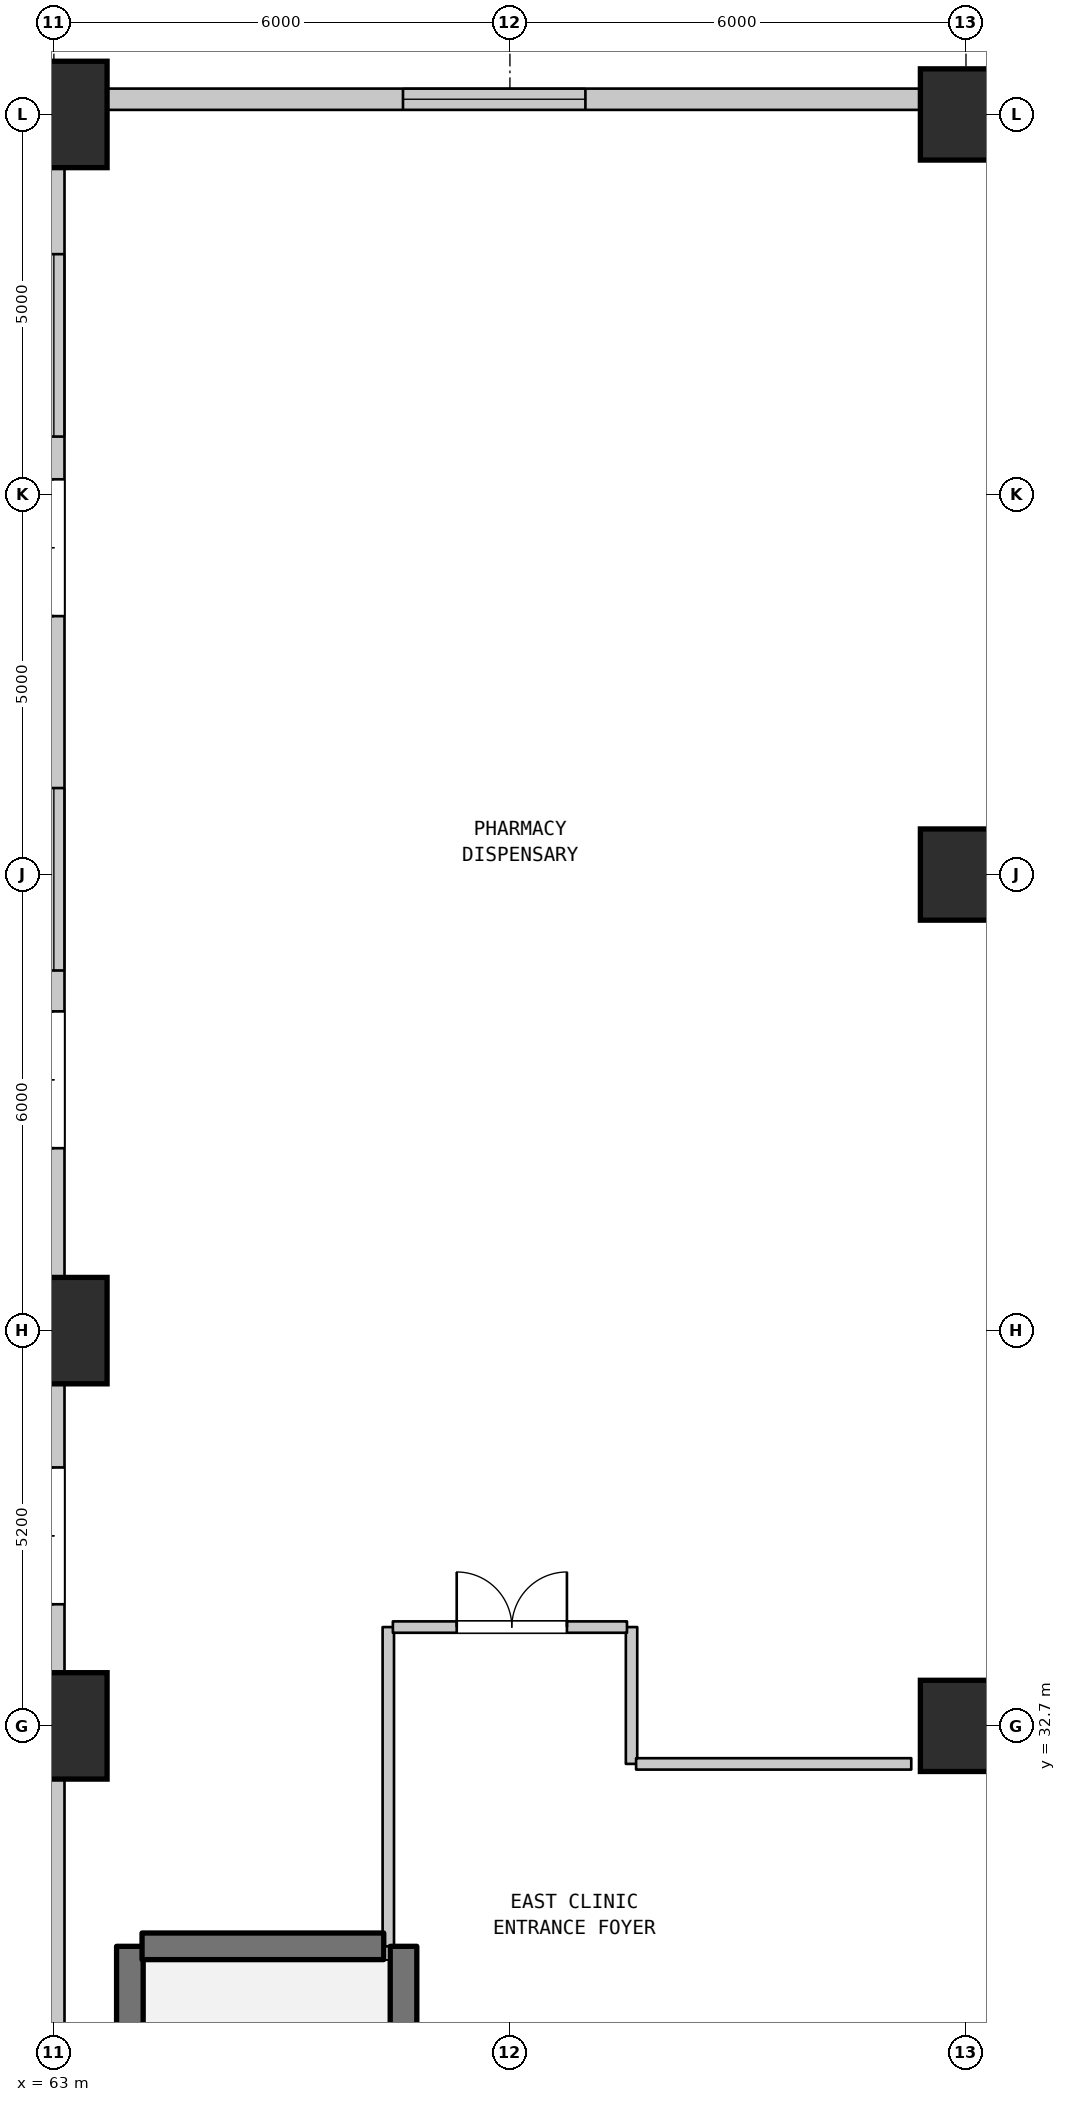
"""IFC4 building model, lengths in metres.
Left out: names, types, materials, properties, quantities, classifications, styles, units other than length and angle.
Written with IfcOpenShell. Run it as: python <this file> out.ifc"""

import sys

from ifc_helpers import new_model, si_unit, direction, frame, frame_2d, origin, origin_2d, place, context, subcontext, project, spatial, rectangle, extrude, element, fill, save


model = new_model("IFC4")
c1 = context("Model", 3, precision=1e-05, world=origin(), true_north=direction((0.0, 1.0)))
c2 = subcontext(c1, "Body", "Model", "MODEL_VIEW")
j1 = project(units=[si_unit("LENGTHUNIT", "METRE"), si_unit("PLANEANGLEUNIT", "RADIAN")], contexts=[c1])
p1 = place(None, origin())
s1 = spatial("IfcSite", under=j1, at=p1, CompositionType="ELEMENT")
p2 = place(p1, origin())
s2 = spatial("IfcBuilding", under=s1, at=p2, CompositionType="ELEMENT")
p3 = place(p2, origin())
s3 = spatial("IfcBuildingStorey", under=s2, at=p3, CompositionType="ELEMENT", Elevation=0.0)
for number, where, z_axis, x_axis in (
    (1, (63.0, 32.7, 0.0), (0.0, 0.0, 1.0), (1.0, 0.0, 0.0)),
    (2, (63.0, 37.9, 0.0), (0.0, 0.0, 1.0), (1.0, 0.0, 0.0)),
    (3, (63.0, 53.9, 0.0), (0.0, 0.0, 1.0), (1.0, 0.0, 0.0)),
):
    element("IfcColumn", number, at=place(p3, frame(where, z_axis=z_axis, x_axis=x_axis)), inside=s3, PredefinedType="PILASTER", context=c2, shape_type="SweptSolid", body=[
        extrude(rectangle(XDim=1.4, YDim=1.4, at=origin_2d()), origin(), (0.0, 0.0, 1.0), 6.5),
    ])
for number, where, z_axis, x_axis in (
    (4, (75.0, 32.7, 0.0), (0.0, 0.0, 1.0), (1.0, 0.0, 0.0)),
    (5, (75.0, 43.9, 0.0), (0.0, 0.0, 1.0), (1.0, 0.0, 0.0)),
    (6, (75.0, 53.9, 0.0), (0.0, 0.0, 1.0), (1.0, 0.0, 0.0)),
):
    element("IfcColumn", number, at=place(p3, frame(where, z_axis=z_axis, x_axis=x_axis)), inside=s3, PredefinedType="PILASTER", context=c2, shape_type="SweptSolid", body=[
        extrude(rectangle(XDim=1.2, YDim=1.2, at=origin_2d()), origin(), (0.0, 0.0, 1.0), 6.5),
    ])
p4 = place(p3, frame((74.586, 54.1, 0.0), z_axis=(0.0, 0.0, 1.0), x_axis=(0.923717339373, -0.383074766777, 0.0)))
e7 = element("IfcWall", 7, at=p4, inside=s3, PredefinedType="STANDARD", context=c2, shape_type="SweptSolid", body=[
    extrude(rectangle(XDim=0.765, YDim=0.28, at=frame_2d((0.383, 0.0))), origin(), (0.0, 0.0, 1.0), 6.17),
])
p5 = place(p3, frame((75.293, 53.807, 0.0), z_axis=(0.0, 0.0, 1.0), x_axis=(0.707167825498, -0.707045731605, 0.0)))
e8 = element("IfcWall", 8, at=p5, inside=s3, PredefinedType="STANDARD", context=c2, shape_type="SweptSolid", body=[
    extrude(rectangle(XDim=2.0, YDim=0.28, at=frame_2d((1.0, 0.0))), origin(), (0.0, 0.0, 1.0), 6.17),
])
p6 = place(p3, frame((63.0, 0.7, 0.0), z_axis=(0.0, 0.0, 1.0), x_axis=(0.0, 1.0, 0.0)))
e9 = element("IfcWall", 9, at=p6, inside=s3, PredefinedType="STANDARD", context=c2, shape_type="SweptSolid", body=[
    extrude(rectangle(XDim=32.0, YDim=0.28, at=frame_2d((16.0, 0.0))), origin(), (0.0, 0.0, 1.0), 5.67),
])
p7 = place(p6, frame((8.1, 0.0, 0.0)))
e10 = element("IfcOpeningElement", 10, at=p7, cuts=e9, PredefinedType="OPENING", context=c2, shape_type="SweptSolid", body=[
    extrude(rectangle(XDim=1.8, YDim=2.4, at=frame_2d((0.9, 1.2))), frame((0.0, 0.15, 0.0), z_axis=(0.0, -1.0, 0.0), x_axis=(1.0, 0.0, 0.0)), (0.0, 0.0, 1.0), 0.3),
])
p8 = place(p6, frame((24.0, 0.0, 0.0)))
e11 = element("IfcOpeningElement", 11, at=p8, cuts=e9, PredefinedType="OPENING", context=c2, shape_type="SweptSolid", body=[
    extrude(rectangle(XDim=1.8, YDim=2.4, at=frame_2d((0.9, 1.2))), frame((0.0, 0.15, 0.0), z_axis=(0.0, -1.0, 0.0), x_axis=(1.0, 0.0, 0.0)), (0.0, 0.0, 1.0), 0.3),
])
p9 = place(p6, frame((2.037, 0.0, 0.9)))
e12 = element("IfcOpeningElement", 12, at=p9, cuts=e9, PredefinedType="OPENING", context=c2, shape_type="SweptSolid", body=[
    extrude(rectangle(XDim=2.4, YDim=2.4, at=frame_2d((1.2, 1.2))), frame((0.0, 0.15, 0.0), z_axis=(0.0, -1.0, 0.0), x_axis=(1.0, 0.0, 0.0)), (0.0, 0.0, 1.0), 0.3),
])
p10 = place(p3, frame((63.0, 54.1, 0.0), z_axis=(0.0, 0.0, 1.0), x_axis=(1.0, 0.0, 0.0)))
e13 = element("IfcWall", 13, at=p10, inside=s3, PredefinedType="STANDARD", context=c2, shape_type="SweptSolid", body=[
    extrude(rectangle(XDim=11.586, YDim=0.28, at=frame_2d((5.793, 0.0))), origin(), (0.0, 0.0, 1.0), 6.17),
])
p11 = place(p10, frame((4.593, 0.0, 0.9)))
e14 = element("IfcOpeningElement", 14, at=p11, cuts=e13, PredefinedType="OPENING", context=c2, shape_type="SweptSolid", body=[
    extrude(rectangle(XDim=2.4, YDim=2.4, at=frame_2d((1.2, 1.2))), frame((0.0, 0.15, 0.0), z_axis=(0.0, -1.0, 0.0), x_axis=(1.0, 0.0, 0.0)), (0.0, 0.0, 1.0), 0.3),
])
p12 = place(p3, frame((64.0, 23.0, 0.0), z_axis=(0.0, 0.0, 1.0), x_axis=(0.0, 1.0, 0.0)))
e15 = element("IfcWall", 15, at=p12, inside=s3, PredefinedType="SHEAR", context=c2, shape_type="SweptSolid", body=[
    extrude(rectangle(XDim=6.8, YDim=0.35, at=frame_2d((3.4, 0.0))), origin(), (0.0, 0.0, 1.0), 6.17),
])
p13 = place(p12, frame((0.45, 0.0, 0.0)))
e16 = element("IfcOpeningElement", 16, at=p13, cuts=e15, PredefinedType="OPENING", context=c2, shape_type="SweptSolid", body=[
    extrude(rectangle(XDim=0.9, YDim=2.15, at=frame_2d((0.45, 1.075))), frame((0.0, 0.185, 0.0), z_axis=(0.0, -1.0, 0.0), x_axis=(1.0, 0.0, 0.0)), (0.0, 0.0, 1.0), 0.37),
])
p14 = place(p3, frame((67.4, 29.8, 0.0), z_axis=(0.0, 0.0, 1.0), x_axis=(0.0, 1.0, 0.0)))
e17 = element("IfcWall", 17, at=p14, inside=s3, PredefinedType="STANDARD", context=c2, shape_type="SweptSolid", body=[
    extrude(rectangle(XDim=4.2, YDim=0.15, at=frame_2d((2.1, 0.0))), origin(), (0.0, 0.0, 1.0), 6.17),
])
p15 = place(p3, frame((67.6, 23.0, 0.0), z_axis=(0.0, 0.0, 1.0), x_axis=(0.0, 1.0, 0.0)))
e18 = element("IfcWall", 18, at=p15, inside=s3, PredefinedType="SHEAR", context=c2, shape_type="SweptSolid", body=[
    extrude(rectangle(XDim=6.8, YDim=0.35, at=frame_2d((3.4, 0.0))), origin(), (0.0, 0.0, 1.0), 6.17),
])
p16 = place(p15, frame((0.265, 0.0, 0.0)))
e19 = element("IfcOpeningElement", 19, at=p16, cuts=e18, PredefinedType="OPENING", context=c2, shape_type="SweptSolid", body=[
    extrude(rectangle(XDim=1.1, YDim=2.15, at=frame_2d((0.55, 1.075))), frame((0.0, 0.185, 0.0), z_axis=(0.0, -1.0, 0.0), x_axis=(1.0, 0.0, 0.0)), (0.0, 0.0, 1.0), 0.37),
])
p17 = place(p3, frame((70.6, 32.2, 0.0), z_axis=(0.0, 0.0, 1.0), x_axis=(0.0, 1.0, 0.0)))
e20 = element("IfcWall", 20, at=p17, inside=s3, PredefinedType="STANDARD", context=c2, shape_type="SweptSolid", body=[
    extrude(rectangle(XDim=1.8, YDim=0.15, at=frame_2d((0.9, 0.0))), origin(), (0.0, 0.0, 1.0), 6.17),
])
p18 = place(p3, frame((64.16, 29.8, 0.0), z_axis=(0.0, 0.0, 1.0), x_axis=(1.0, 0.0, 0.0)))
e21 = element("IfcWall", 21, at=p18, inside=s3, PredefinedType="SHEAR", context=c2, shape_type="SweptSolid", body=[
    extrude(rectangle(XDim=3.18, YDim=0.35, at=frame_2d((1.59, 0.0))), origin(), (0.0, 0.0, 1.0), 6.17),
])
p19 = place(p3, frame((70.66, 32.2, 0.0), z_axis=(0.0, 0.0, 1.0), x_axis=(1.0, 0.0, 0.0)))
e22 = element("IfcWall", 22, at=p19, inside=s3, PredefinedType="STANDARD", context=c2, shape_type="SweptSolid", body=[
    extrude(rectangle(XDim=3.62, YDim=0.15, at=frame_2d((1.81, 0.0))), origin(), (0.0, 0.0, 1.0), 6.17),
])
p20 = place(p3, frame((67.46, 34.0, 0.0), z_axis=(0.0, 0.0, 1.0), x_axis=(1.0, 0.0, 0.0)))
e23 = element("IfcWall", 23, at=p20, inside=s3, PredefinedType="STANDARD", context=c2, shape_type="SweptSolid", body=[
    extrude(rectangle(XDim=3.08, YDim=0.15, at=frame_2d((1.54, 0.0))), origin(), (0.0, 0.0, 1.0), 6.17),
])
p21 = place(p20, frame((0.84, 0.0, 0.0)))
e24 = element("IfcOpeningElement", 24, at=p21, cuts=e23, PredefinedType="OPENING", context=c2, shape_type="SweptSolid", body=[
    extrude(rectangle(XDim=1.45, YDim=2.2, at=frame_2d((0.725, 1.1))), frame((0.0, 0.085, 0.0), z_axis=(0.0, -1.0, 0.0), x_axis=(1.0, 0.0, 0.0)), (0.0, 0.0, 1.0), 0.17),
])
p22 = place(p3, frame((63.0, 32.7, 0.0), z_axis=(0.0, 0.0, 1.0), x_axis=(0.0, 1.0, 0.0)))
e25 = element("IfcWall", 25, at=p22, inside=s3, PredefinedType="STANDARD", context=c2, shape_type="SweptSolid", body=[
    extrude(rectangle(XDim=21.4, YDim=0.28, at=frame_2d((10.7, 0.0))), origin(), (0.0, 0.0, 1.0), 5.57),
])
p23 = place(p22, frame((1.6, 0.0, 0.0)))
e26 = element("IfcOpeningElement", 26, at=p23, cuts=e25, PredefinedType="OPENING", context=c2, shape_type="SweptSolid", body=[
    extrude(rectangle(XDim=1.8, YDim=2.4, at=frame_2d((0.9, 1.2))), frame((0.0, 0.15, 0.0), z_axis=(0.0, -1.0, 0.0), x_axis=(1.0, 0.0, 0.0)), (0.0, 0.0, 1.0), 0.3),
])
p24 = place(p22, frame((7.6, 0.0, 0.0)))
e27 = element("IfcOpeningElement", 27, at=p24, cuts=e25, PredefinedType="OPENING", context=c2, shape_type="SweptSolid", body=[
    extrude(rectangle(XDim=1.8, YDim=2.4, at=frame_2d((0.9, 1.2))), frame((0.0, 0.15, 0.0), z_axis=(0.0, -1.0, 0.0), x_axis=(1.0, 0.0, 0.0)), (0.0, 0.0, 1.0), 0.3),
])
p25 = place(p22, frame((14.6, 0.0, 0.0)))
e28 = element("IfcOpeningElement", 28, at=p25, cuts=e25, PredefinedType="OPENING", context=c2, shape_type="SweptSolid", body=[
    extrude(rectangle(XDim=1.8, YDim=2.4, at=frame_2d((0.9, 1.2))), frame((0.0, 0.15, 0.0), z_axis=(0.0, -1.0, 0.0), x_axis=(1.0, 0.0, 0.0)), (0.0, 0.0, 1.0), 0.3),
])
p26 = place(p22, frame((9.938, 0.0, 0.9)))
e29 = element("IfcOpeningElement", 29, at=p26, cuts=e25, PredefinedType="OPENING", context=c2, shape_type="SweptSolid", body=[
    extrude(rectangle(XDim=2.4, YDim=2.4, at=frame_2d((1.2, 1.2))), frame((0.0, 0.15, 0.0), z_axis=(0.0, -1.0, 0.0), x_axis=(1.0, 0.0, 0.0)), (0.0, 0.0, 1.0), 0.3),
])
p27 = place(p22, frame((16.962, 0.0, 0.9)))
e30 = element("IfcOpeningElement", 30, at=p27, cuts=e25, PredefinedType="OPENING", context=c2, shape_type="SweptSolid", body=[
    extrude(rectangle(XDim=2.4, YDim=2.4, at=frame_2d((1.2, 1.2))), frame((0.0, 0.15, 0.0), z_axis=(0.0, -1.0, 0.0), x_axis=(1.0, 0.0, 0.0)), (0.0, 0.0, 1.0), 0.3),
])
p28 = place(p23, origin())
e31 = element("IfcDoor", 31, at=p28, inside=s3, OperationType="DOUBLE_DOOR_SINGLE_SWING", PredefinedType="DOOR", context=c2, shape_type="SweptSolid", body=[
    extrude(rectangle(XDim=1.8, YDim=2.4, at=frame_2d((0.9, 1.2))), frame((0.0, 0.025, 0.0), z_axis=(0.0, -1.0, 0.0), x_axis=(1.0, 0.0, 0.0)), (0.0, 0.0, 1.0), 0.05),
])
fill(e26, e31)
p29 = place(p24, origin())
e32 = element("IfcDoor", 32, at=p29, inside=s3, OperationType="DOUBLE_DOOR_SINGLE_SWING", PredefinedType="DOOR", context=c2, shape_type="SweptSolid", body=[
    extrude(rectangle(XDim=1.8, YDim=2.4, at=frame_2d((0.9, 1.2))), frame((0.0, 0.025, 0.0), z_axis=(0.0, -1.0, 0.0), x_axis=(1.0, 0.0, 0.0)), (0.0, 0.0, 1.0), 0.05),
])
fill(e27, e32)
p30 = place(p25, origin())
e33 = element("IfcDoor", 33, at=p30, inside=s3, OperationType="DOUBLE_DOOR_SINGLE_SWING", PredefinedType="DOOR", context=c2, shape_type="SweptSolid", body=[
    extrude(rectangle(XDim=1.8, YDim=2.4, at=frame_2d((0.9, 1.2))), frame((0.0, 0.025, 0.0), z_axis=(0.0, -1.0, 0.0), x_axis=(1.0, 0.0, 0.0)), (0.0, 0.0, 1.0), 0.05),
])
fill(e28, e33)
p31 = place(p26, origin())
e34 = element("IfcWindow", 34, at=p31, inside=s3, PartitioningType="DOUBLE_PANEL_VERTICAL", PredefinedType="WINDOW", context=c2, shape_type="SweptSolid", body=[
    extrude(rectangle(XDim=2.4, YDim=2.4, at=frame_2d((1.2, 1.2))), frame((0.0, 0.03, 0.0), z_axis=(0.0, -1.0, 0.0), x_axis=(1.0, 0.0, 0.0)), (0.0, 0.0, 1.0), 0.06),
])
fill(e29, e34)
p32 = place(p27, origin())
e35 = element("IfcWindow", 35, at=p32, inside=s3, PartitioningType="DOUBLE_PANEL_VERTICAL", PredefinedType="WINDOW", context=c2, shape_type="SweptSolid", body=[
    extrude(rectangle(XDim=2.4, YDim=2.4, at=frame_2d((1.2, 1.2))), frame((0.0, 0.03, 0.0), z_axis=(0.0, -1.0, 0.0), x_axis=(1.0, 0.0, 0.0)), (0.0, 0.0, 1.0), 0.06),
])
fill(e30, e35)
p33 = place(p11, origin())
e36 = element("IfcWindow", 36, at=p33, inside=s3, PartitioningType="DOUBLE_PANEL_VERTICAL", PredefinedType="WINDOW", context=c2, shape_type="SweptSolid", body=[
    extrude(rectangle(XDim=2.4, YDim=2.4, at=frame_2d((1.2, 1.2))), frame((0.0, 0.03, 0.0), z_axis=(0.0, -1.0, 0.0), x_axis=(1.0, 0.0, 0.0)), (0.0, 0.0, 1.0), 0.06),
])
fill(e14, e36)
p34 = place(p21, origin())
e37 = element("IfcDoor", 37, at=p34, inside=s3, OperationType="DOUBLE_DOOR_SINGLE_SWING", PredefinedType="DOOR", context=c2, shape_type="SweptSolid", body=[
    extrude(rectangle(XDim=1.45, YDim=2.2, at=frame_2d((0.725, 1.1))), frame((0.0, 0.025, 0.0), z_axis=(0.0, -1.0, 0.0), x_axis=(1.0, 0.0, 0.0)), (0.0, 0.0, 1.0), 0.05),
])
fill(e24, e37)
save(model, sys.argv[1])
